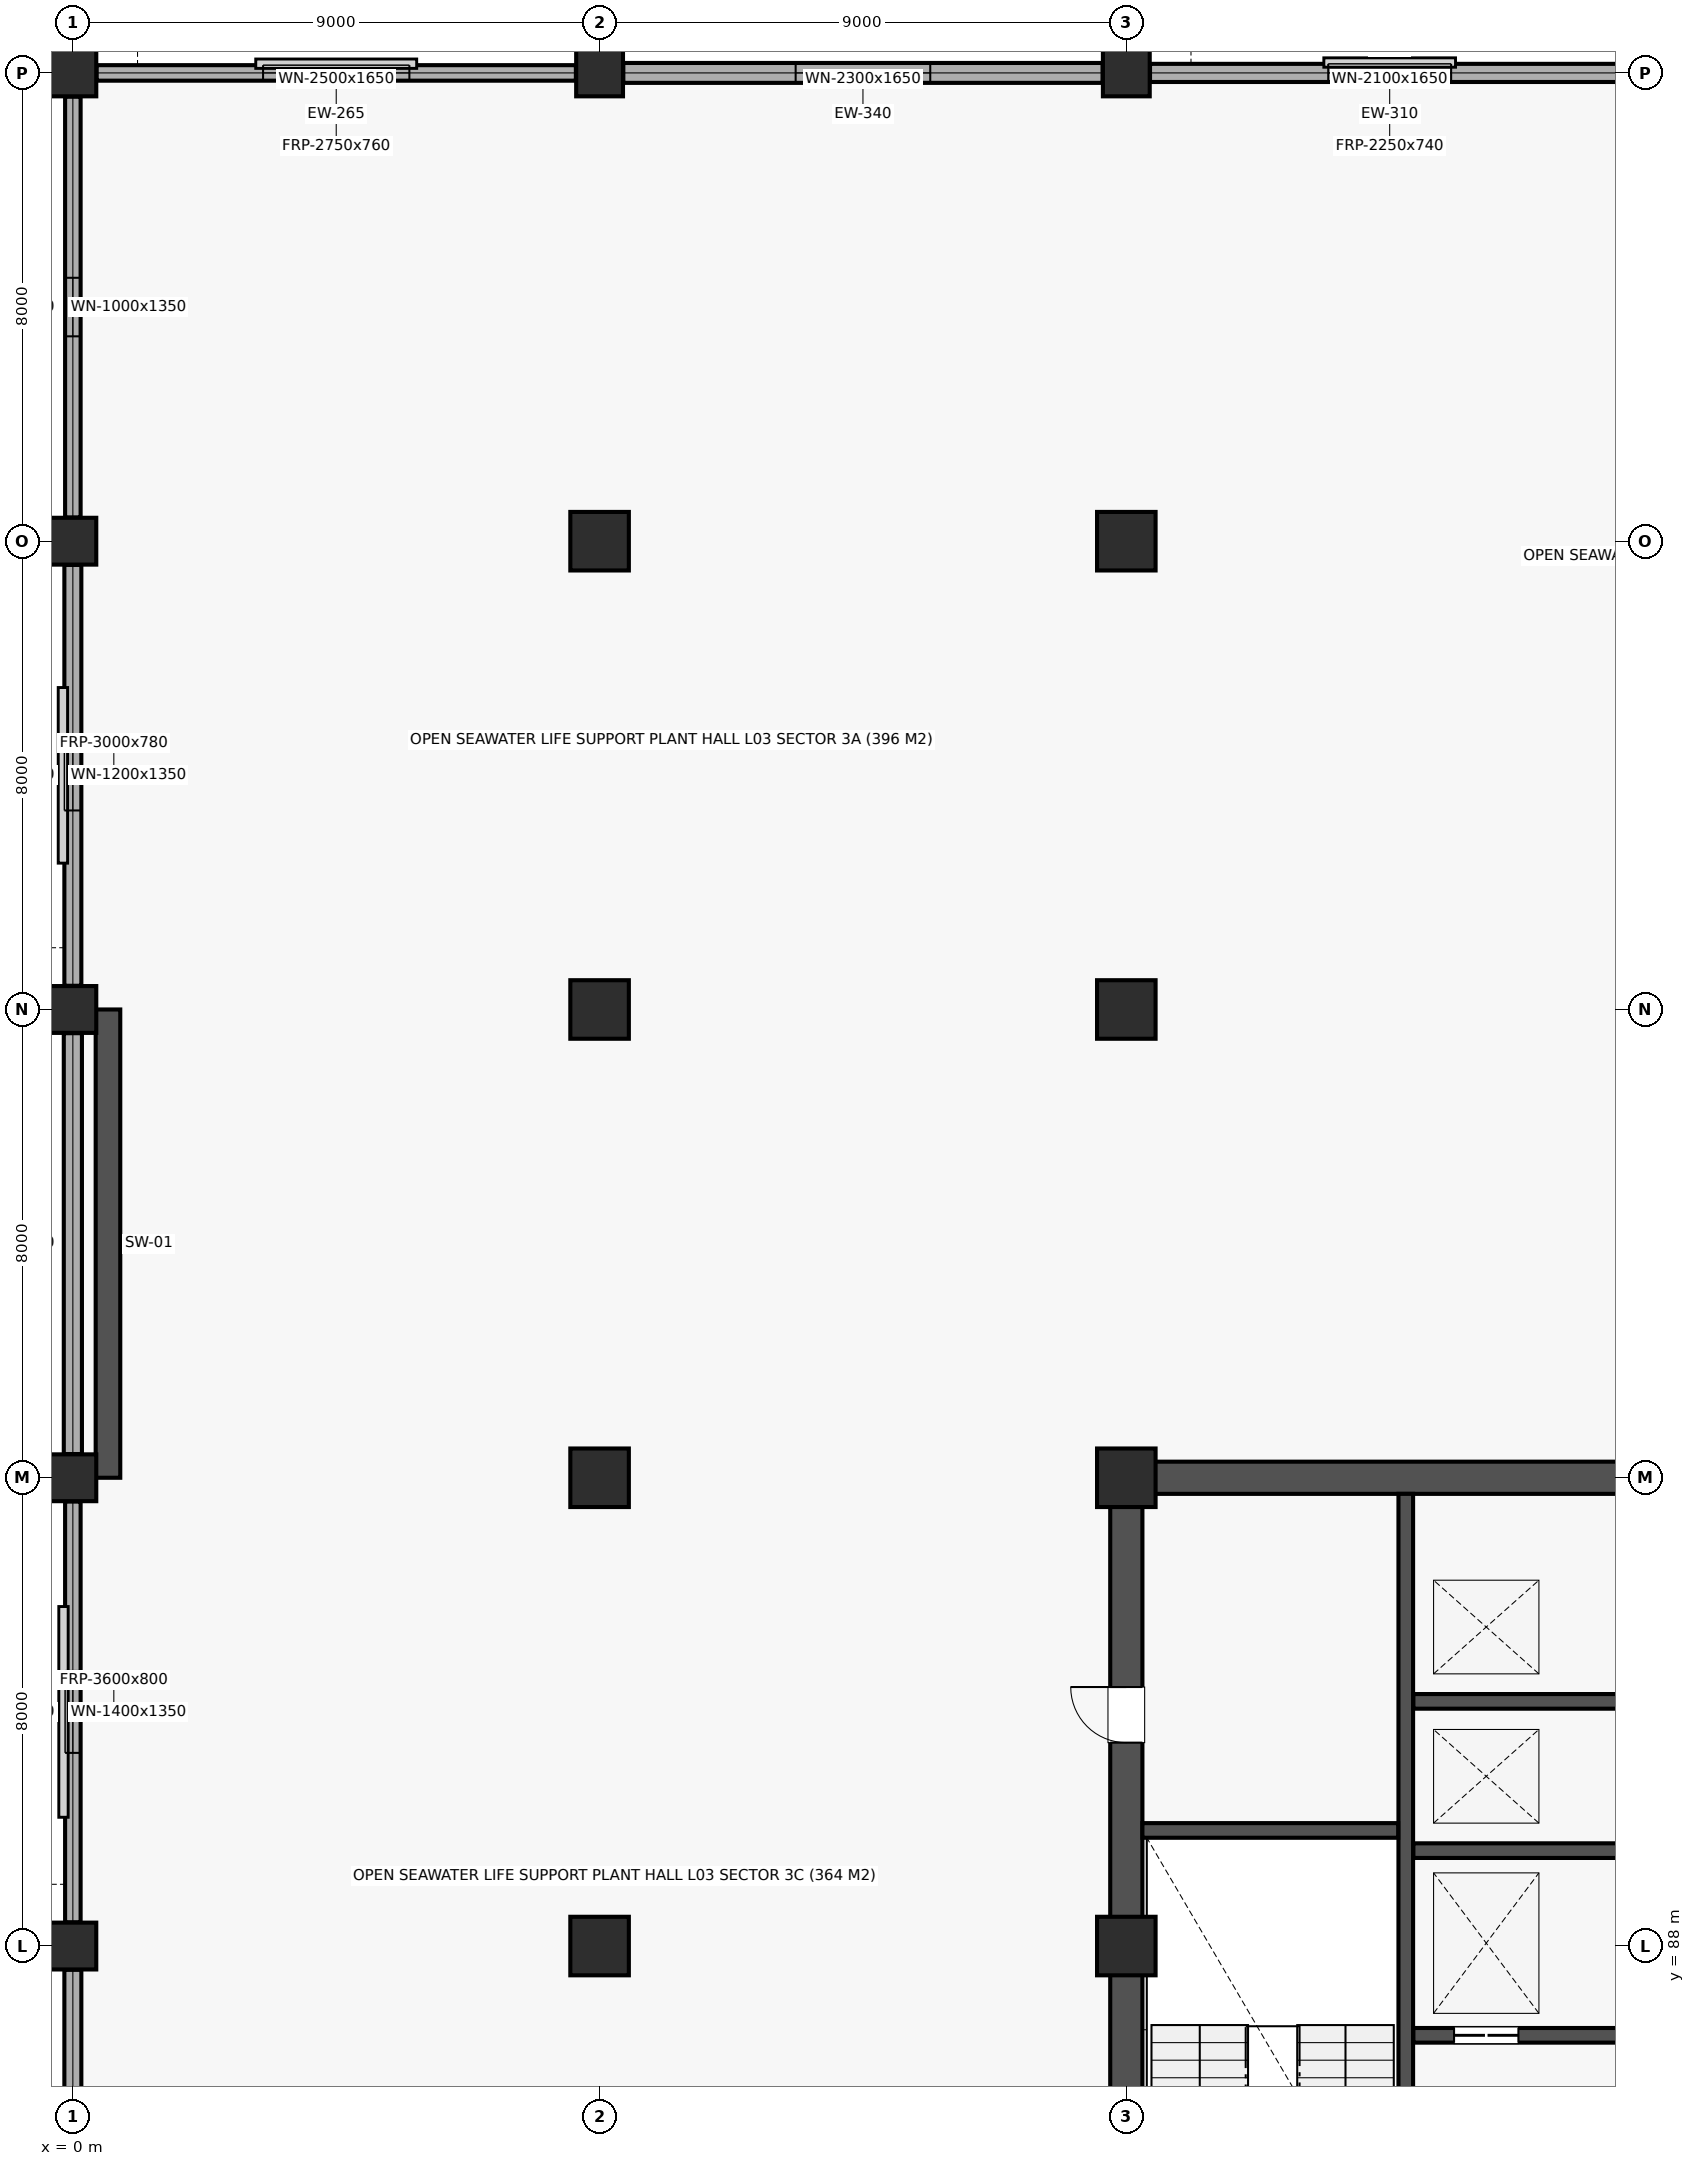
"""IFC4 building model, lengths in metres.
Left out: names, types, materials, properties, quantities, classifications, styles, units other than length and angle.
Written with IfcOpenShell. Run it as: python <this file> out.ifc"""

import sys

from ifc_helpers import new_model, si_unit, direction, frame, frame_2d, origin, origin_2d, place, context, subcontext, project, spatial, rectangle, extrude, element, fill, save


model = new_model("IFC4")
c1 = context("Model", 3, precision=1e-05, world=origin(), true_north=direction((0.0, 1.0)))
c2 = subcontext(c1, "Body", "Model", "MODEL_VIEW")
j1 = project(units=[si_unit("LENGTHUNIT", "METRE"), si_unit("PLANEANGLEUNIT", "RADIAN")], contexts=[c1])
p1 = place(None, origin())
s1 = spatial("IfcSite", under=j1, at=p1, CompositionType="ELEMENT")
p2 = place(p1, origin())
s2 = spatial("IfcBuilding", under=s1, at=p2, CompositionType="ELEMENT")
p3 = place(p2, frame((0.0, 0.0, 13.5)))
s3 = spatial("IfcBuildingStorey", under=s2, at=p3, CompositionType="ELEMENT", Elevation=13.5)
for number, where, z_axis, x_axis in (
    (1, (0.0, 88.0, 0.0), (0.0, 0.0, 1.0), (1.0, 0.0, 0.0)),
    (2, (0.0, 96.0, 0.0), (0.0, 0.0, 1.0), (1.0, 0.0, 0.0)),
    (3, (0.0, 104.0, 0.0), (0.0, 0.0, 1.0), (1.0, 0.0, 0.0)),
    (4, (0.0, 112.0, 0.0), (0.0, 0.0, 1.0), (1.0, 0.0, 0.0)),
    (5, (0.0, 120.0, 0.0), (0.0, 0.0, 1.0), (1.0, 0.0, 0.0)),
):
    element("IfcColumn", number, at=place(p3, frame(where, z_axis=z_axis, x_axis=x_axis)), inside=s3, PredefinedType="COLUMN", context=c2, shape_type="SweptSolid", body=[
        extrude(rectangle(XDim=0.8, YDim=0.8, at=origin_2d()), origin(), (0.0, 0.0, 1.0), 4.2),
    ])
for number, where, z_axis, x_axis in (
    (6, (9.0, 88.0, 0.0), (0.0, 0.0, 1.0), (1.0, 0.0, 0.0)),
    (7, (9.0, 96.0, 0.0), (0.0, 0.0, 1.0), (1.0, 0.0, 0.0)),
    (8, (9.0, 104.0, 0.0), (0.0, 0.0, 1.0), (1.0, 0.0, 0.0)),
    (9, (9.0, 112.0, 0.0), (0.0, 0.0, 1.0), (1.0, 0.0, 0.0)),
):
    element("IfcColumn", number, at=place(p3, frame(where, z_axis=z_axis, x_axis=x_axis)), inside=s3, PredefinedType="COLUMN", context=c2, shape_type="SweptSolid", body=[
        extrude(rectangle(XDim=1.0, YDim=1.0, at=origin_2d()), origin(), (0.0, 0.0, 1.0), 4.5),
    ])
p4 = place(p3, frame((9.0, 120.0, 0.0), z_axis=(0.0, 0.0, 1.0), x_axis=(1.0, 0.0, 0.0)))
e10 = element("IfcColumn", 10, at=p4, inside=s3, PredefinedType="COLUMN", context=c2, shape_type="SweptSolid", body=[
    extrude(rectangle(XDim=0.8, YDim=0.8, at=origin_2d()), origin(), (0.0, 0.0, 1.0), 4.2),
])
for number, where, z_axis, x_axis in (
    (11, (18.0, 88.0, 0.0), (0.0, 0.0, 1.0), (1.0, 0.0, 0.0)),
    (12, (18.0, 96.0, 0.0), (0.0, 0.0, 1.0), (1.0, 0.0, 0.0)),
    (13, (18.0, 104.0, 0.0), (0.0, 0.0, 1.0), (1.0, 0.0, 0.0)),
    (14, (18.0, 112.0, 0.0), (0.0, 0.0, 1.0), (1.0, 0.0, 0.0)),
):
    element("IfcColumn", number, at=place(p3, frame(where, z_axis=z_axis, x_axis=x_axis)), inside=s3, PredefinedType="COLUMN", context=c2, shape_type="SweptSolid", body=[
        extrude(rectangle(XDim=1.0, YDim=1.0, at=origin_2d()), origin(), (0.0, 0.0, 1.0), 4.5),
    ])
p5 = place(p3, frame((18.0, 120.0, 0.0), z_axis=(0.0, 0.0, 1.0), x_axis=(1.0, 0.0, 0.0)))
e15 = element("IfcColumn", 15, at=p5, inside=s3, PredefinedType="COLUMN", context=c2, shape_type="SweptSolid", body=[
    extrude(rectangle(XDim=0.8, YDim=0.8, at=origin_2d()), origin(), (0.0, 0.0, 1.0), 4.2),
])
p6 = place(p3, frame((0.6, 96.0, 0.0), z_axis=(0.0, 0.0, 1.0), x_axis=(0.0, 1.0, 0.0)))
e16 = element("IfcWall", 16, at=p6, inside=s3, PredefinedType="SHEAR", context=c2, shape_type="SweptSolid", body=[
    extrude(rectangle(XDim=8.0, YDim=0.42, at=frame_2d((4.0, 0.0))), origin(), (0.0, 0.0, 1.0), 4.2),
])
p7 = place(p3, frame((18.275, 96.0, 0.0), z_axis=(0.0, 0.0, 1.0), x_axis=(1.0, 0.0, 0.0)))
e17 = element("IfcWall", 17, at=p7, inside=s3, PredefinedType="SHEAR", context=c2, shape_type="SweptSolid", body=[
    extrude(rectangle(XDim=8.45, YDim=0.55, at=frame_2d((4.225, 0.0))), origin(), (0.0, 0.0, 1.0), 4.2),
])
p8 = place(p3, frame((18.0, 80.275, 0.0), z_axis=(0.0, 0.0, 1.0), x_axis=(0.0, 1.0, 0.0)))
e18 = element("IfcWall", 18, at=p8, inside=s3, PredefinedType="SHEAR", context=c2, shape_type="SweptSolid", body=[
    extrude(rectangle(XDim=15.45, YDim=0.55, at=frame_2d((7.725, 0.0))), origin(), (0.0, 0.0, 1.0), 4.2),
])
p9 = place(p8, frame((11.2, 0.0, 0.0)))
e19 = element("IfcOpeningElement", 19, at=p9, cuts=e18, PredefinedType="OPENING", context=c2, shape_type="SweptSolid", body=[
    extrude(rectangle(XDim=0.95, YDim=2.1, at=frame_2d((0.475, 1.05))), frame((0.0, 0.287, 0.0), z_axis=(0.0, -1.0, 0.0), x_axis=(1.0, 0.0, 0.0)), (0.0, 0.0, 1.0), 0.574),
])
p10 = place(p3, frame((22.775, 80.275, 0.0), z_axis=(0.0, 0.0, 1.0), x_axis=(0.0, 1.0, 0.0)))
e20 = element("IfcWall", 20, at=p10, inside=s3, PredefinedType="SOLIDWALL", context=c2, shape_type="SweptSolid", body=[
    extrude(rectangle(XDim=15.45, YDim=0.25, at=frame_2d((7.725, 0.0))), origin(), (0.0, 0.0, 1.0), 4.2),
])
p11 = place(p10, frame((0.45, 0.0, 0.0)))
e21 = element("IfcOpeningElement", 21, at=p11, cuts=e20, PredefinedType="OPENING", context=c2, shape_type="SweptSolid", body=[
    extrude(rectangle(XDim=1.1, YDim=2.15, at=frame_2d((0.55, 1.075))), frame((0.0, 0.137, 0.0), z_axis=(0.0, -1.0, 0.0), x_axis=(1.0, 0.0, 0.0)), (0.0, 0.0, 1.0), 0.274),
])
p12 = place(p3, frame((18.275, 89.975, 0.0), z_axis=(0.0, 0.0, 1.0), x_axis=(1.0, 0.0, 0.0)))
e22 = element("IfcWall", 22, at=p12, inside=s3, PredefinedType="SOLIDWALL", context=c2, shape_type="SweptSolid", body=[
    extrude(rectangle(XDim=4.37, YDim=0.25, at=frame_2d((2.185, 0.0))), origin(), (0.0, 0.0, 1.0), 4.2),
])
p13 = place(p3, frame((22.905, 86.475, 0.0), z_axis=(0.0, 0.0, 1.0), x_axis=(1.0, 0.0, 0.0)))
e23 = element("IfcWall", 23, at=p13, inside=s3, PredefinedType="SOLIDWALL", context=c2, shape_type="SweptSolid", body=[
    extrude(rectangle(XDim=3.82, YDim=0.25, at=frame_2d((1.91, 0.0))), origin(), (0.0, 0.0, 1.0), 4.2),
])
p14 = place(p13, frame((0.695, 0.0, 0.0)))
e24 = element("IfcOpeningElement", 24, at=p14, cuts=e23, PredefinedType="OPENING", context=c2, shape_type="SweptSolid", body=[
    extrude(rectangle(XDim=1.1, YDim=2.12, at=frame_2d((0.55, 1.06))), frame((0.0, 0.137, 0.0), z_axis=(0.0, -1.0, 0.0), x_axis=(1.0, 0.0, 0.0)), (0.0, 0.0, 1.0), 0.274),
])
for number, where, z_axis, x_axis in (
    (25, (22.905, 89.63, 0.0), (0.0, 0.0, 1.0), (1.0, 0.0, 0.0)),
    (26, (22.905, 92.18, 0.0), (0.0, 0.0, 1.0), (1.0, 0.0, 0.0)),
):
    element("IfcWall", number, at=place(p3, frame(where, z_axis=z_axis, x_axis=x_axis)), inside=s3, PredefinedType="SOLIDWALL", context=c2, shape_type="SweptSolid", body=[
        extrude(rectangle(XDim=3.82, YDim=0.25, at=frame_2d((1.91, 0.0))), origin(), (0.0, 0.0, 1.0), 4.2),
    ])
p15 = place(p3, frame((0.405, 120.0, 0.0), z_axis=(0.0, 0.0, 1.0), x_axis=(1.0, 0.0, 0.0)))
e27 = element("IfcWall", 27, at=p15, inside=s3, PredefinedType="STANDARD", context=c2, shape_type="SweptSolid", body=[
    extrude(rectangle(XDim=8.19, YDim=0.265, at=frame_2d((4.095, 0.0))), origin(), (0.0, 0.0, 1.0), 3.48),
])
p16 = place(p15, frame((2.845, 0.0, 0.85)))
e28 = element("IfcOpeningElement", 28, at=p16, cuts=e27, PredefinedType="OPENING", context=c2, shape_type="SweptSolid", body=[
    extrude(rectangle(XDim=2.5, YDim=1.65, at=frame_2d((1.25, 0.825))), frame((0.0, 0.145, 0.0), z_axis=(0.0, -1.0, 0.0), x_axis=(1.0, 0.0, 0.0)), (0.0, 0.0, 1.0), 0.289),
])
p17 = place(p3, frame((9.405, 120.0, 0.0), z_axis=(0.0, 0.0, 1.0), x_axis=(1.0, 0.0, 0.0)))
e29 = element("IfcWall", 29, at=p17, inside=s3, PredefinedType="STANDARD", context=c2, shape_type="SweptSolid", body=[
    extrude(rectangle(XDim=8.19, YDim=0.34, at=frame_2d((4.095, 0.0))), origin(), (0.0, 0.0, 1.0), 3.48),
])
p18 = place(p17, frame((2.945, 0.0, 0.85)))
e30 = element("IfcOpeningElement", 30, at=p18, cuts=e29, PredefinedType="OPENING", context=c2, shape_type="SweptSolid", body=[
    extrude(rectangle(XDim=2.3, YDim=1.65, at=frame_2d((1.15, 0.825))), frame((0.0, 0.182, 0.0), z_axis=(0.0, -1.0, 0.0), x_axis=(1.0, 0.0, 0.0)), (0.0, 0.0, 1.0), 0.364),
])
p19 = place(p3, frame((18.405, 120.0, 0.0), z_axis=(0.0, 0.0, 1.0), x_axis=(1.0, 0.0, 0.0)))
e31 = element("IfcWall", 31, at=p19, inside=s3, PredefinedType="STANDARD", context=c2, shape_type="SweptSolid", body=[
    extrude(rectangle(XDim=8.19, YDim=0.31, at=frame_2d((4.095, 0.0))), origin(), (0.0, 0.0, 1.0), 3.48),
])
p20 = place(p19, frame((3.045, 0.0, 0.85)))
e32 = element("IfcOpeningElement", 32, at=p20, cuts=e31, PredefinedType="OPENING", context=c2, shape_type="SweptSolid", body=[
    extrude(rectangle(XDim=2.1, YDim=1.65, at=frame_2d((1.05, 0.825))), frame((0.0, 0.167, 0.0), z_axis=(0.0, -1.0, 0.0), x_axis=(1.0, 0.0, 0.0)), (0.0, 0.0, 1.0), 0.334),
])
p21 = place(p3, frame((0.0, 80.405, 0.0), z_axis=(0.0, 0.0, 1.0), x_axis=(0.0, 1.0, 0.0)))
e33 = element("IfcWall", 33, at=p21, inside=s3, PredefinedType="STANDARD", context=c2, shape_type="SweptSolid", body=[
    extrude(rectangle(XDim=7.19, YDim=0.29, at=frame_2d((3.595, 0.0))), origin(), (0.0, 0.0, 1.0), 3.48),
])
p22 = place(p21, frame((2.795, 0.0, 0.85)))
e34 = element("IfcOpeningElement", 34, at=p22, cuts=e33, PredefinedType="OPENING", context=c2, shape_type="SweptSolid", body=[
    extrude(rectangle(XDim=1.6, YDim=1.35, at=frame_2d((0.8, 0.675))), frame((0.0, 0.157, 0.0), z_axis=(0.0, -1.0, 0.0), x_axis=(1.0, 0.0, 0.0)), (0.0, 0.0, 1.0), 0.314),
])
p23 = place(p3, frame((0.0, 88.405, 0.0), z_axis=(0.0, 0.0, 1.0), x_axis=(0.0, 1.0, 0.0)))
e35 = element("IfcWall", 35, at=p23, inside=s3, PredefinedType="STANDARD", context=c2, shape_type="SweptSolid", body=[
    extrude(rectangle(XDim=7.19, YDim=0.265, at=frame_2d((3.595, 0.0))), origin(), (0.0, 0.0, 1.0), 3.48),
])
p24 = place(p23, frame((2.895, 0.0, 0.85)))
e36 = element("IfcOpeningElement", 36, at=p24, cuts=e35, PredefinedType="OPENING", context=c2, shape_type="SweptSolid", body=[
    extrude(rectangle(XDim=1.4, YDim=1.35, at=frame_2d((0.7, 0.675))), frame((0.0, 0.145, 0.0), z_axis=(0.0, -1.0, 0.0), x_axis=(1.0, 0.0, 0.0)), (0.0, 0.0, 1.0), 0.289),
])
p25 = place(p3, frame((0.0, 96.405, 0.0), z_axis=(0.0, 0.0, 1.0), x_axis=(0.0, 1.0, 0.0)))
e37 = element("IfcWall", 37, at=p25, inside=s3, PredefinedType="STANDARD", context=c2, shape_type="SweptSolid", body=[
    extrude(rectangle(XDim=7.19, YDim=0.31, at=frame_2d((3.595, 0.0))), origin(), (0.0, 0.0, 1.0), 3.48),
])
p26 = place(p3, frame((0.0, 104.405, 0.0), z_axis=(0.0, 0.0, 1.0), x_axis=(0.0, 1.0, 0.0)))
e38 = element("IfcWall", 38, at=p26, inside=s3, PredefinedType="STANDARD", context=c2, shape_type="SweptSolid", body=[
    extrude(rectangle(XDim=7.19, YDim=0.29, at=frame_2d((3.595, 0.0))), origin(), (0.0, 0.0, 1.0), 3.48),
])
p27 = place(p26, frame((2.995, 0.0, 0.85)))
e39 = element("IfcOpeningElement", 39, at=p27, cuts=e38, PredefinedType="OPENING", context=c2, shape_type="SweptSolid", body=[
    extrude(rectangle(XDim=1.2, YDim=1.35, at=frame_2d((0.6, 0.675))), frame((0.0, 0.157, 0.0), z_axis=(0.0, -1.0, 0.0), x_axis=(1.0, 0.0, 0.0)), (0.0, 0.0, 1.0), 0.314),
])
p28 = place(p3, frame((0.0, 112.405, 0.0), z_axis=(0.0, 0.0, 1.0), x_axis=(0.0, 1.0, 0.0)))
e40 = element("IfcWall", 40, at=p28, inside=s3, PredefinedType="STANDARD", context=c2, shape_type="SweptSolid", body=[
    extrude(rectangle(XDim=7.19, YDim=0.265, at=frame_2d((3.595, 0.0))), origin(), (0.0, 0.0, 1.0), 3.48),
])
p29 = place(p28, frame((3.095, 0.0, 0.85)))
e41 = element("IfcOpeningElement", 41, at=p29, cuts=e40, PredefinedType="OPENING", context=c2, shape_type="SweptSolid", body=[
    extrude(rectangle(XDim=1.0, YDim=1.35, at=frame_2d((0.5, 0.675))), frame((0.0, 0.145, 0.0), z_axis=(0.0, -1.0, 0.0), x_axis=(1.0, 0.0, 0.0)), (0.0, 0.0, 1.0), 0.289),
])
p30 = place(p9, origin())
e42 = element("IfcDoor", 42, at=p30, inside=s3, OperationType="SINGLE_SWING_RIGHT", PredefinedType="DOOR", context=c2, shape_type="SweptSolid", body=[
    extrude(rectangle(XDim=0.95, YDim=2.1, at=frame_2d((0.475, 1.05))), frame((0.0, 0.025, 0.0), z_axis=(0.0, -1.0, 0.0), x_axis=(1.0, 0.0, 0.0)), (0.0, 0.0, 1.0), 0.05),
])
fill(e19, e42)
p31 = place(p14, origin())
e43 = element("IfcDoor", 43, at=p31, inside=s3, OperationType="DOUBLE_DOOR_SLIDING", PredefinedType="DOOR", context=c2, shape_type="SweptSolid", body=[
    extrude(rectangle(XDim=1.1, YDim=2.12, at=frame_2d((0.55, 1.06))), frame((0.0, 0.025, 0.0), z_axis=(0.0, -1.0, 0.0), x_axis=(1.0, 0.0, 0.0)), (0.0, 0.0, 1.0), 0.05),
])
fill(e24, e43)
p32 = place(p16, origin())
e44 = element("IfcWindow", 44, at=p32, inside=s3, PartitioningType="SINGLE_PANEL", PredefinedType="WINDOW", context=c2, shape_type="SweptSolid", body=[
    extrude(rectangle(XDim=2.5, YDim=1.65, at=frame_2d((1.25, 0.825))), frame((0.0, 0.03, 0.0), z_axis=(0.0, -1.0, 0.0), x_axis=(1.0, 0.0, 0.0)), (0.0, 0.0, 1.0), 0.06),
])
fill(e28, e44)
p33 = place(p18, origin())
e45 = element("IfcWindow", 45, at=p33, inside=s3, PartitioningType="SINGLE_PANEL", PredefinedType="WINDOW", context=c2, shape_type="SweptSolid", body=[
    extrude(rectangle(XDim=2.3, YDim=1.65, at=frame_2d((1.15, 0.825))), frame((0.0, 0.03, 0.0), z_axis=(0.0, -1.0, 0.0), x_axis=(1.0, 0.0, 0.0)), (0.0, 0.0, 1.0), 0.06),
])
fill(e30, e45)
p34 = place(p20, origin())
e46 = element("IfcWindow", 46, at=p34, inside=s3, PartitioningType="SINGLE_PANEL", PredefinedType="WINDOW", context=c2, shape_type="SweptSolid", body=[
    extrude(rectangle(XDim=2.1, YDim=1.65, at=frame_2d((1.05, 0.825))), frame((0.0, 0.03, 0.0), z_axis=(0.0, -1.0, 0.0), x_axis=(1.0, 0.0, 0.0)), (0.0, 0.0, 1.0), 0.06),
])
fill(e32, e46)
p35 = place(p24, origin())
e47 = element("IfcWindow", 47, at=p35, inside=s3, PartitioningType="SINGLE_PANEL", PredefinedType="WINDOW", context=c2, shape_type="SweptSolid", body=[
    extrude(rectangle(XDim=1.4, YDim=1.35, at=frame_2d((0.7, 0.675))), frame((0.0, 0.03, 0.0), z_axis=(0.0, -1.0, 0.0), x_axis=(1.0, 0.0, 0.0)), (0.0, 0.0, 1.0), 0.06),
])
fill(e36, e47)
p36 = place(p27, origin())
e48 = element("IfcWindow", 48, at=p36, inside=s3, PartitioningType="SINGLE_PANEL", PredefinedType="WINDOW", context=c2, shape_type="SweptSolid", body=[
    extrude(rectangle(XDim=1.2, YDim=1.35, at=frame_2d((0.6, 0.675))), frame((0.0, 0.03, 0.0), z_axis=(0.0, -1.0, 0.0), x_axis=(1.0, 0.0, 0.0)), (0.0, 0.0, 1.0), 0.06),
])
fill(e39, e48)
p37 = place(p29, origin())
e49 = element("IfcWindow", 49, at=p37, inside=s3, PartitioningType="SINGLE_PANEL", PredefinedType="WINDOW", context=c2, shape_type="SweptSolid", body=[
    extrude(rectangle(XDim=1.0, YDim=1.35, at=frame_2d((0.5, 0.675))), frame((0.0, 0.03, 0.0), z_axis=(0.0, -1.0, 0.0), x_axis=(1.0, 0.0, 0.0)), (0.0, 0.0, 1.0), 0.06),
])
fill(e41, e49)
save(model, sys.argv[1])
